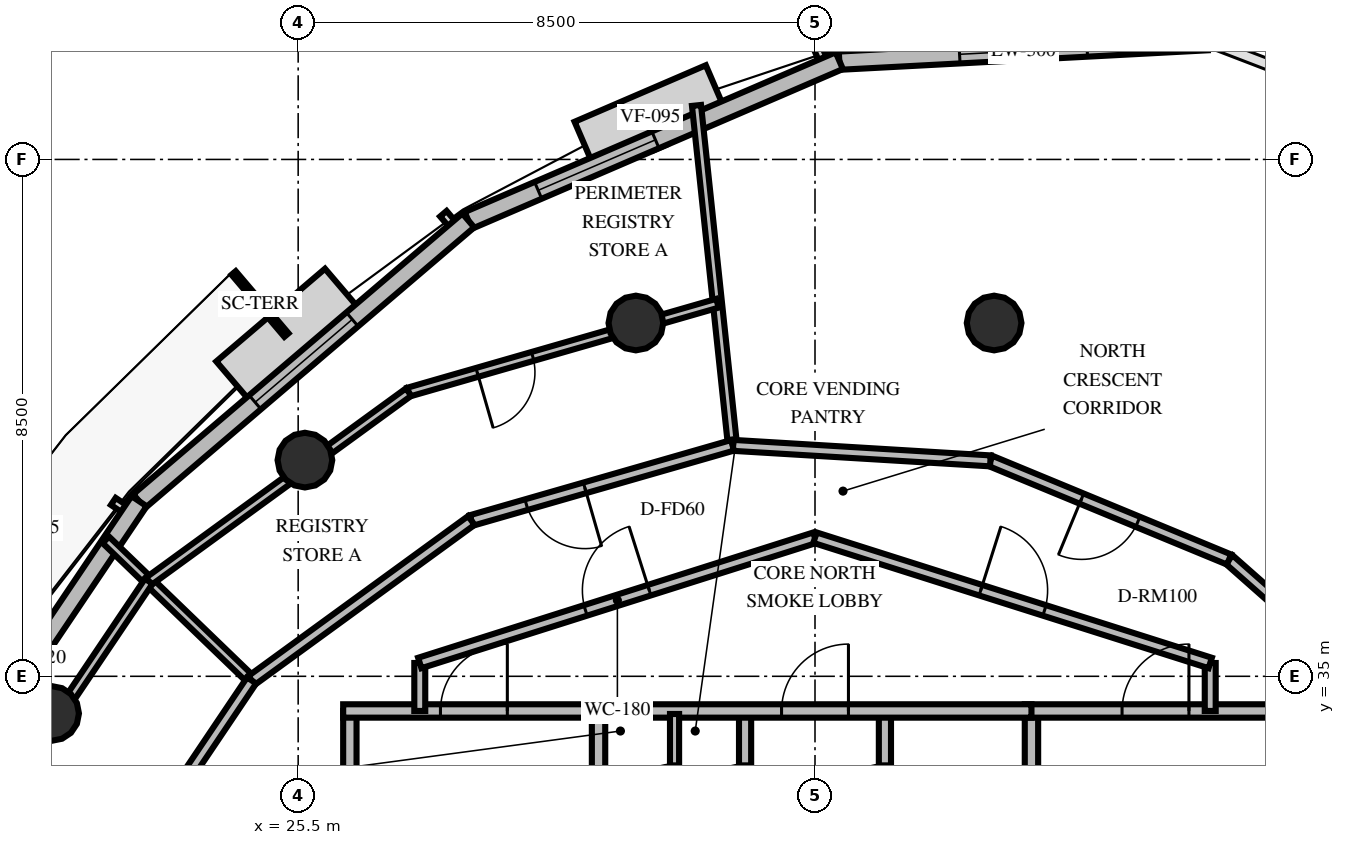
"""IFC4 building model, lengths in metres.
Left out: names, types, materials, properties, quantities, classifications, styles, units other than length and angle.
Written with IfcOpenShell. Run it as: python <this file> out.ifc"""

import sys

from ifc_helpers import new_model, si_unit, direction, frame, frame_2d, origin, origin_2d, place, context, subcontext, project, spatial, rectangle, circle, extrude, element, fill, save


model = new_model("IFC4")
c1 = context("Model", 3, precision=1e-05, world=origin(), true_north=direction((0.0, 1.0)))
c2 = subcontext(c1, "Body", "Model", "MODEL_VIEW")
j1 = project(units=[si_unit("LENGTHUNIT", "METRE"), si_unit("PLANEANGLEUNIT", "RADIAN")], contexts=[c1])
p1 = place(None, origin())
s1 = spatial("IfcSite", under=j1, at=p1, CompositionType="ELEMENT")
p2 = place(p1, origin())
s2 = spatial("IfcBuilding", under=s1, at=p2, CompositionType="ELEMENT")
p3 = place(p2, frame((0.0, 0.0, 262.8)))
s3 = spatial("IfcBuildingStorey", under=s2, at=p3, CompositionType="ELEMENT", Elevation=262.8)
for number, where, z_axis, x_axis in (
    (1, (36.946, 40.81, 0.0), (0.0, 0.0, 1.0), (1.0, 0.0, 0.0)),
    (2, (31.054, 40.81, 0.0), (0.0, 0.0, 1.0), (1.0, 0.0, 0.0)),
    (3, (25.611, 38.555, 0.0), (0.0, 0.0, 1.0), (1.0, 0.0, 0.0)),
    (4, (21.445, 34.389, 0.0), (0.0, 0.0, 1.0), (1.0, 0.0, 0.0)),
):
    element("IfcColumn", number, at=place(p3, frame(where, z_axis=z_axis, x_axis=x_axis)), inside=s3, PredefinedType="COLUMN", context=c2, shape_type="SweptSolid", body=[
        extrude(circle(Radius=0.45, at=origin_2d()), origin(), (0.0, 0.0, 1.0), 3.6),
    ])
p4 = place(p3, frame((40.453, 45.445, 0.0), z_axis=(0.0, 0.0, 1.0), x_axis=(-0.998600866894, -0.052880134633, 0.0)))
e5 = element("IfcWall", 5, at=p4, inside=s3, PredefinedType="SOLIDWALL", context=c2, shape_type="SweptSolid", body=[
    extrude(rectangle(XDim=6.062, YDim=0.3, at=frame_2d((3.031, 0.0))), origin(), (0.0, 0.0, 1.0), 2.76),
])
p5 = place(p4, frame((1.981, 0.0, 0.8)))
e6 = element("IfcOpeningElement", 6, at=p5, cuts=e5, PredefinedType="OPENING", context=c2, shape_type="SweptSolid", body=[
    extrude(rectangle(XDim=2.1, YDim=1.85, at=frame_2d((1.05, 0.925))), frame((0.0, 0.16, 0.0), z_axis=(0.0, -1.0, 0.0), x_axis=(1.0, 0.0, 0.0)), (0.0, 0.0, 1.0), 0.32),
])
p6 = place(p3, frame((34.399, 45.124, 0.0), z_axis=(0.0, 0.0, 1.0), x_axis=(-0.918476494061, -0.395475574287, 0.0)))
e7 = element("IfcWall", 7, at=p6, inside=s3, PredefinedType="SOLIDWALL", context=c2, shape_type="SweptSolid", body=[
    extrude(rectangle(XDim=6.643, YDim=0.3, at=frame_2d((3.322, 0.0))), origin(), (0.0, 0.0, 1.0), 2.76),
])
p7 = place(p6, frame((3.292, 0.0, 0.8)))
e8 = element("IfcOpeningElement", 8, at=p7, cuts=e7, PredefinedType="OPENING", context=c2, shape_type="SweptSolid", body=[
    extrude(rectangle(XDim=2.1, YDim=1.85, at=frame_2d((1.05, 0.925))), frame((0.0, 0.16, 0.0), z_axis=(0.0, -1.0, 0.0), x_axis=(1.0, 0.0, 0.0)), (0.0, 0.0, 1.0), 0.32),
])
p8 = place(p3, frame((28.298, 42.497, 0.0), z_axis=(0.0, 0.0, 1.0), x_axis=(-0.760867335081, -0.648907465211, 0.0)))
e9 = element("IfcWall", 9, at=p8, inside=s3, PredefinedType="SOLIDWALL", context=c2, shape_type="SweptSolid", body=[
    extrude(rectangle(XDim=7.115, YDim=0.3, at=frame_2d((3.558, 0.0))), origin(), (0.0, 0.0, 1.0), 2.76),
])
p9 = place(p8, frame((2.508, 0.0, 0.8)))
e10 = element("IfcOpeningElement", 10, at=p9, cuts=e9, PredefinedType="OPENING", context=c2, shape_type="SweptSolid", body=[
    extrude(rectangle(XDim=2.1, YDim=1.85, at=frame_2d((1.05, 0.925))), frame((0.0, 0.16, 0.0), z_axis=(0.0, -1.0, 0.0), x_axis=(1.0, 0.0, 0.0)), (0.0, 0.0, 1.0), 0.32),
])
p10 = place(p3, frame((22.884, 37.88, 0.0), z_axis=(0.0, 0.0, 1.0), x_axis=(-0.558472062766, -0.829523330057, 0.0)))
e11 = element("IfcWall", 11, at=p10, inside=s3, PredefinedType="SOLIDWALL", context=c2, shape_type="SweptSolid", body=[
    extrude(rectangle(XDim=7.293, YDim=0.3, at=frame_2d((3.646, 0.0))), origin(), (0.0, 0.0, 1.0), 2.76),
])
p11 = place(p10, frame((5.87, 0.0, 0.0)))
e12 = element("IfcOpeningElement", 12, at=p11, cuts=e11, PredefinedType="OPENING", context=c2, shape_type="SweptSolid", body=[
    extrude(rectangle(XDim=1.05, YDim=2.15, at=frame_2d((0.525, 1.075))), frame((0.0, 0.16, 0.0), z_axis=(0.0, -1.0, 0.0), x_axis=(1.0, 0.0, 0.0)), (0.0, 0.0, 1.0), 0.32),
])
p12 = place(p3, frame((26.35, 30.05, 0.0), z_axis=(0.0, 0.0, 1.0), x_axis=(0.0, 1.0, 0.0)))
e13 = element("IfcWall", 13, at=p12, inside=s3, PredefinedType="SOLIDWALL", context=c2, shape_type="SweptSolid", body=[
    extrude(rectangle(XDim=4.38, YDim=0.22, at=frame_2d((2.19, 0.0))), origin(), (0.0, 0.0, 1.0), 2.46),
])
p13 = place(p3, frame((30.44, 30.05, 0.0), z_axis=(0.0, 0.0, 1.0), x_axis=(0.0, 1.0, 0.0)))
e14 = element("IfcWall", 14, at=p13, inside=s3, PredefinedType="SOLIDWALL", context=c2, shape_type="SweptSolid", body=[
    extrude(rectangle(XDim=4.38, YDim=0.22, at=frame_2d((2.19, 0.0))), origin(), (0.0, 0.0, 1.0), 2.46),
])
p14 = place(p13, frame((0.8, 0.0, 0.0)))
e15 = element("IfcOpeningElement", 15, at=p14, cuts=e14, PredefinedType="OPENING", context=c2, shape_type="SweptSolid", body=[
    extrude(rectangle(XDim=1.05, YDim=2.1, at=frame_2d((0.525, 1.05))), frame((0.0, 0.12, 0.0), z_axis=(0.0, -1.0, 0.0), x_axis=(1.0, 0.0, 0.0)), (0.0, 0.0, 1.0), 0.24),
])
p15 = place(p3, frame((26.24, 34.43, 0.0), z_axis=(0.0, 0.0, 1.0), x_axis=(1.0, 0.0, 0.0)))
e16 = element("IfcWall", 16, at=p15, inside=s3, PredefinedType="SOLIDWALL", context=c2, shape_type="SweptSolid", body=[
    extrude(rectangle(XDim=4.31, YDim=0.22, at=frame_2d((2.155, 0.0))), origin(), (0.0, 0.0, 1.0), 2.46),
])
p16 = place(p15, frame((1.6, 0.0, 0.0)))
e17 = element("IfcOpeningElement", 17, at=p16, cuts=e16, PredefinedType="OPENING", context=c2, shape_type="SweptSolid", body=[
    extrude(rectangle(XDim=1.1, YDim=2.15, at=frame_2d((0.55, 1.075))), frame((0.0, 0.12, 0.0), z_axis=(0.0, -1.0, 0.0), x_axis=(1.0, 0.0, 0.0)), (0.0, 0.0, 1.0), 0.24),
])
p17 = place(p3, frame((32.85, 30.05, 0.0), z_axis=(0.0, 0.0, 1.0), x_axis=(0.0, 1.0, 0.0)))
e18 = element("IfcWall", 18, at=p17, inside=s3, PredefinedType="SOLIDWALL", context=c2, shape_type="SweptSolid", body=[
    extrude(rectangle(XDim=4.38, YDim=0.2, at=frame_2d((2.19, 0.0))), origin(), (0.0, 0.0, 1.0), 2.46),
])
p18 = place(p17, frame((2.65, 0.0, 0.0)))
e19 = element("IfcOpeningElement", 19, at=p18, cuts=e18, PredefinedType="OPENING", context=c2, shape_type="SweptSolid", body=[
    extrude(rectangle(XDim=0.86, YDim=2.05, at=frame_2d((0.43, 1.025))), frame((0.0, 0.11, 0.0), z_axis=(0.0, -1.0, 0.0), x_axis=(1.0, 0.0, 0.0)), (0.0, 0.0, 1.0), 0.22),
])
p19 = place(p3, frame((37.56, 30.05, 0.0), z_axis=(0.0, 0.0, 1.0), x_axis=(0.0, 1.0, 0.0)))
e20 = element("IfcWall", 20, at=p19, inside=s3, PredefinedType="SOLIDWALL", context=c2, shape_type="SweptSolid", body=[
    extrude(rectangle(XDim=4.38, YDim=0.22, at=frame_2d((2.19, 0.0))), origin(), (0.0, 0.0, 1.0), 2.46),
])
p20 = place(p19, frame((0.8, 0.0, 0.0)))
e21 = element("IfcOpeningElement", 21, at=p20, cuts=e20, PredefinedType="OPENING", context=c2, shape_type="SweptSolid", body=[
    extrude(rectangle(XDim=1.05, YDim=2.1, at=frame_2d((0.525, 1.05))), frame((0.0, 0.12, 0.0), z_axis=(0.0, -1.0, 0.0), x_axis=(1.0, 0.0, 0.0)), (0.0, 0.0, 1.0), 0.24),
])
p21 = place(p3, frame((37.45, 34.43, 0.0), z_axis=(0.0, 0.0, 1.0), x_axis=(1.0, 0.0, 0.0)))
e22 = element("IfcWall", 22, at=p21, inside=s3, PredefinedType="SOLIDWALL", context=c2, shape_type="SweptSolid", body=[
    extrude(rectangle(XDim=4.31, YDim=0.22, at=frame_2d((2.155, 0.0))), origin(), (0.0, 0.0, 1.0), 2.46),
])
p22 = place(p21, frame((1.6, 0.0, 0.0)))
e23 = element("IfcOpeningElement", 23, at=p22, cuts=e22, PredefinedType="OPENING", context=c2, shape_type="SweptSolid", body=[
    extrude(rectangle(XDim=1.1, YDim=2.15, at=frame_2d((0.55, 1.075))), frame((0.0, 0.12, 0.0), z_axis=(0.0, -1.0, 0.0), x_axis=(1.0, 0.0, 0.0)), (0.0, 0.0, 1.0), 0.24),
])
p23 = place(p3, frame((35.15, 30.05, 0.0), z_axis=(0.0, 0.0, 1.0), x_axis=(0.0, 1.0, 0.0)))
e24 = element("IfcWall", 24, at=p23, inside=s3, PredefinedType="SOLIDWALL", context=c2, shape_type="SweptSolid", body=[
    extrude(rectangle(XDim=4.38, YDim=0.2, at=frame_2d((2.19, 0.0))), origin(), (0.0, 0.0, 1.0), 2.46),
])
p24 = place(p23, frame((2.65, 0.0, 0.0)))
e25 = element("IfcOpeningElement", 25, at=p24, cuts=e24, PredefinedType="OPENING", context=c2, shape_type="SweptSolid", body=[
    extrude(rectangle(XDim=0.86, YDim=2.05, at=frame_2d((0.43, 1.025))), frame((0.0, 0.11, 0.0), z_axis=(0.0, -1.0, 0.0), x_axis=(1.0, 0.0, 0.0)), (0.0, 0.0, 1.0), 0.22),
])
p25 = place(p3, frame((30.44, 34.43, 0.0), z_axis=(0.0, 0.0, 1.0), x_axis=(1.0, 0.0, 0.0)))
e26 = element("IfcWall", 26, at=p25, inside=s3, PredefinedType="SOLIDWALL", context=c2, shape_type="SweptSolid", body=[
    extrude(rectangle(XDim=7.12, YDim=0.22, at=frame_2d((3.56, 0.0))), origin(), (0.0, 0.0, 1.0), 2.46),
])
p26 = place(p25, frame((3.01, 0.0, 0.0)))
e27 = element("IfcOpeningElement", 27, at=p26, cuts=e26, PredefinedType="OPENING", context=c2, shape_type="SweptSolid", body=[
    extrude(rectangle(XDim=1.1, YDim=2.15, at=frame_2d((0.55, 1.075))), frame((0.0, 0.12, 0.0), z_axis=(0.0, -1.0, 0.0), x_axis=(1.0, 0.0, 0.0)), (0.0, 0.0, 1.0), 0.24),
])
p27 = place(p3, frame((31.69, 32.05, 0.0), z_axis=(0.0, 0.0, 1.0), x_axis=(0.0, 1.0, 0.0)))
e28 = element("IfcWall", 28, at=p27, inside=s3, PredefinedType="PARTITIONING", context=c2, shape_type="SweptSolid", body=[
    extrude(rectangle(XDim=2.33, YDim=0.15, at=frame_2d((1.165, 0.0))), origin(), (0.0, 0.0, 1.0), 2.46),
])
p28 = place(p27, frame((0.65, 0.0, 0.0)))
e29 = element("IfcOpeningElement", 29, at=p28, cuts=e28, PredefinedType="OPENING", context=c2, shape_type="SweptSolid", body=[
    extrude(rectangle(XDim=0.86, YDim=2.05, at=frame_2d((0.43, 1.025))), frame((0.0, 0.085, 0.0), z_axis=(0.0, -1.0, 0.0), x_axis=(1.0, 0.0, 0.0)), (0.0, 0.0, 1.0), 0.17),
])
for number, where, z_axis, x_axis in (
    (30, (27.5, 34.43, 0.0), (0.0, 0.0, 1.0), (0.0, 1.0, 0.0)),
    (31, (40.5, 35.219, 0.0), (0.0, 0.0, 1.0), (0.0, -1.0, 0.0)),
):
    element("IfcWall", number, at=place(p3, frame(where, z_axis=z_axis, x_axis=x_axis)), inside=s3, PredefinedType="PARTITIONING", context=c2, shape_type="SweptSolid", body=[
        extrude(rectangle(XDim=0.789, YDim=0.18, at=frame_2d((0.395, 0.0))), origin(), (0.0, 0.0, 1.0), 2.46),
    ])
p29 = place(p3, frame((27.5, 35.219, 0.0), z_axis=(0.0, 0.0, 1.0), x_axis=(0.953228121756, 0.302251795518, 0.0)))
e32 = element("IfcWall", 32, at=p29, inside=s3, PredefinedType="PARTITIONING", context=c2, shape_type="SweptSolid", body=[
    extrude(rectangle(XDim=6.819, YDim=0.18, at=frame_2d((3.409, 0.0))), origin(), (0.0, 0.0, 1.0), 2.46),
])
p30 = place(p29, frame((2.86, 0.0, 0.0)))
e33 = element("IfcOpeningElement", 33, at=p30, cuts=e32, PredefinedType="OPENING", context=c2, shape_type="SweptSolid", body=[
    extrude(rectangle(XDim=1.1, YDim=2.15, at=frame_2d((0.55, 1.075))), frame((0.0, 0.1, 0.0), z_axis=(0.0, -1.0, 0.0), x_axis=(1.0, 0.0, 0.0)), (0.0, 0.0, 1.0), 0.2),
])
p31 = place(p3, frame((34.0, 37.28, 0.0), z_axis=(0.0, 0.0, 1.0), x_axis=(0.953228121756, -0.302251795518, 0.0)))
e34 = element("IfcWall", 34, at=p31, inside=s3, PredefinedType="PARTITIONING", context=c2, shape_type="SweptSolid", body=[
    extrude(rectangle(XDim=6.819, YDim=0.18, at=frame_2d((3.409, 0.0))), origin(), (0.0, 0.0, 1.0), 2.46),
])
p32 = place(p31, frame((2.86, 0.0, 0.0)))
e35 = element("IfcOpeningElement", 35, at=p32, cuts=e34, PredefinedType="OPENING", context=c2, shape_type="SweptSolid", body=[
    extrude(rectangle(XDim=1.1, YDim=2.15, at=frame_2d((0.55, 1.075))), frame((0.0, 0.1, 0.0), z_axis=(0.0, -1.0, 0.0), x_axis=(1.0, 0.0, 0.0)), (0.0, 0.0, 1.0), 0.2),
])
p33 = place(p3, frame((32.644, 38.798, 0.0), z_axis=(0.0, 0.0, 1.0), x_axis=(-0.105410494611, 0.994428794648, 0.0)))
e36 = element("IfcWall", 36, at=p33, inside=s3, PredefinedType="PARTITIONING", context=c2, shape_type="SweptSolid", body=[
    extrude(rectangle(XDim=5.621, YDim=0.15, at=frame_2d((2.811, 0.0))), origin(), (0.0, 0.0, 1.0), 2.46),
])
p34 = place(p3, frame((43.995, 34.108, 0.0), z_axis=(0.0, 0.0, 1.0), x_axis=(-0.749539264815, 0.66195988587, 0.0)))
e37 = element("IfcWall", 37, at=p34, inside=s3, PredefinedType="PARTITIONING", context=c2, shape_type="SweptSolid", body=[
    extrude(rectangle(XDim=4.248, YDim=0.18, at=frame_2d((2.124, 0.0))), origin(), (0.0, 0.0, 1.0), 2.46),
])
p35 = place(p3, frame((40.811, 36.92, 0.0), z_axis=(0.0, 0.0, 1.0), x_axis=(-0.924212047163, 0.381879682465, 0.0)))
e38 = element("IfcWall", 38, at=p35, inside=s3, PredefinedType="PARTITIONING", context=c2, shape_type="SweptSolid", body=[
    extrude(rectangle(XDim=4.248, YDim=0.18, at=frame_2d((2.124, 0.0))), origin(), (0.0, 0.0, 1.0), 2.46),
])
p36 = place(p35, frame((1.624, 0.0, 0.0)))
e39 = element("IfcOpeningElement", 39, at=p36, cuts=e38, PredefinedType="OPENING", context=c2, shape_type="SweptSolid", body=[
    extrude(rectangle(XDim=1.0, YDim=2.15, at=frame_2d((0.5, 1.075))), frame((0.0, 0.1, 0.0), z_axis=(0.0, -1.0, 0.0), x_axis=(1.0, 0.0, 0.0)), (0.0, 0.0, 1.0), 0.2),
])
p37 = place(p3, frame((36.884, 38.543, 0.0), z_axis=(0.0, 0.0, 1.0), x_axis=(-0.998188316722, 0.06016713688, 0.0)))
e40 = element("IfcWall", 40, at=p37, inside=s3, PredefinedType="PARTITIONING", context=c2, shape_type="SweptSolid", body=[
    extrude(rectangle(XDim=4.249, YDim=0.18, at=frame_2d((2.124, 0.0))), origin(), (0.0, 0.0, 1.0), 2.46),
])
p38 = place(p3, frame((24.734, 34.932, 0.0), z_axis=(0.0, 0.0, 1.0), x_axis=(-0.719960692402, 0.694014842345, 0.0)))
e41 = element("IfcWall", 41, at=p38, inside=s3, PredefinedType="PARTITIONING", context=c2, shape_type="SweptSolid", body=[
    extrude(rectangle(XDim=3.331, YDim=0.15, at=frame_2d((1.666, 0.0))), origin(), (0.0, 0.0, 1.0), 2.46),
])
p39 = place(p3, frame((32.644, 38.798, 0.0), z_axis=(0.0, 0.0, 1.0), x_axis=(-0.961015255025, -0.276495351878, 0.0)))
e42 = element("IfcWall", 42, at=p39, inside=s3, PredefinedType="PARTITIONING", context=c2, shape_type="SweptSolid", body=[
    extrude(rectangle(XDim=4.47, YDim=0.18, at=frame_2d((2.235, 0.0))), origin(), (0.0, 0.0, 1.0), 2.46),
])
p40 = place(p39, frame((2.527, 0.0, 0.0)))
e43 = element("IfcOpeningElement", 43, at=p40, cuts=e42, PredefinedType="OPENING", context=c2, shape_type="SweptSolid", body=[
    extrude(rectangle(XDim=1.0, YDim=2.15, at=frame_2d((0.5, 1.075))), frame((0.0, 0.1, 0.0), z_axis=(0.0, -1.0, 0.0), x_axis=(1.0, 0.0, 0.0)), (0.0, 0.0, 1.0), 0.2),
])
p41 = place(p3, frame((28.348, 37.562, 0.0), z_axis=(0.0, 0.0, 1.0), x_axis=(-0.808504545443, -0.588489931942, 0.0)))
e44 = element("IfcWall", 44, at=p41, inside=s3, PredefinedType="PARTITIONING", context=c2, shape_type="SweptSolid", body=[
    extrude(rectangle(XDim=4.47, YDim=0.18, at=frame_2d((2.235, 0.0))), origin(), (0.0, 0.0, 1.0), 2.46),
])
p42 = place(p3, frame((32.396, 41.135, 0.0), z_axis=(0.0, 0.0, 1.0), x_axis=(-0.961020381867, -0.276477531882, 0.0)))
e45 = element("IfcWall", 45, at=p42, inside=s3, PredefinedType="PARTITIONING", context=c2, shape_type="SweptSolid", body=[
    extrude(rectangle(XDim=5.286, YDim=0.15, at=frame_2d((2.643, 0.0))), origin(), (0.0, 0.0, 1.0), 2.46),
])
p43 = place(p42, frame((3.162, 0.0, 0.0)))
e46 = element("IfcOpeningElement", 46, at=p43, cuts=e45, PredefinedType="OPENING", context=c2, shape_type="SweptSolid", body=[
    extrude(rectangle(XDim=0.95, YDim=2.15, at=frame_2d((0.475, 1.075))), frame((0.0, 0.085, 0.0), z_axis=(0.0, -1.0, 0.0), x_axis=(1.0, 0.0, 0.0)), (0.0, 0.0, 1.0), 0.17),
])
p44 = place(p3, frame((27.316, 39.674, 0.0), z_axis=(0.0, 0.0, 1.0), x_axis=(-0.808492350613, -0.588506685604, 0.0)))
e47 = element("IfcWall", 47, at=p44, inside=s3, PredefinedType="PARTITIONING", context=c2, shape_type="SweptSolid", body=[
    extrude(rectangle(XDim=5.286, YDim=0.15, at=frame_2d((2.643, 0.0))), origin(), (0.0, 0.0, 1.0), 2.46),
])
p45 = place(p3, frame((24.734, 34.932, 0.0), z_axis=(0.0, 0.0, 1.0), x_axis=(-0.558488411433, -0.829512323172, 0.0)))
e48 = element("IfcWall", 48, at=p45, inside=s3, PredefinedType="PARTITIONING", context=c2, shape_type="SweptSolid", body=[
    extrude(rectangle(XDim=4.47, YDim=0.18, at=frame_2d((2.235, 0.0))), origin(), (0.0, 0.0, 1.0), 2.46),
])
p46 = place(p3, frame((23.042, 36.563, 0.0), z_axis=(0.0, 0.0, 1.0), x_axis=(-0.558510235994, -0.829497628863, 0.0)))
e49 = element("IfcWall", 49, at=p46, inside=s3, PredefinedType="PARTITIONING", context=c2, shape_type="SweptSolid", body=[
    extrude(rectangle(XDim=5.286, YDim=0.15, at=frame_2d((2.643, 0.0))), origin(), (0.0, 0.0, 1.0), 2.46),
])
p47 = place(p5, origin())
e50 = element("IfcWindow", 50, at=p47, inside=s3, PartitioningType="SINGLE_PANEL", PredefinedType="WINDOW", context=c2, shape_type="SweptSolid", body=[
    extrude(rectangle(XDim=2.1, YDim=1.85, at=frame_2d((1.05, 0.925))), frame((0.0, 0.03, 0.0), z_axis=(0.0, -1.0, 0.0), x_axis=(1.0, 0.0, 0.0)), (0.0, 0.0, 1.0), 0.06),
])
fill(e6, e50)
p48 = place(p7, origin())
e51 = element("IfcWindow", 51, at=p48, inside=s3, PartitioningType="SINGLE_PANEL", PredefinedType="WINDOW", context=c2, shape_type="SweptSolid", body=[
    extrude(rectangle(XDim=2.1, YDim=1.85, at=frame_2d((1.05, 0.925))), frame((0.0, 0.03, 0.0), z_axis=(0.0, -1.0, 0.0), x_axis=(1.0, 0.0, 0.0)), (0.0, 0.0, 1.0), 0.06),
])
fill(e8, e51)
p49 = place(p9, origin())
e52 = element("IfcWindow", 52, at=p49, inside=s3, PartitioningType="SINGLE_PANEL", PredefinedType="WINDOW", context=c2, shape_type="SweptSolid", body=[
    extrude(rectangle(XDim=2.1, YDim=1.85, at=frame_2d((1.05, 0.925))), frame((0.0, 0.03, 0.0), z_axis=(0.0, -1.0, 0.0), x_axis=(1.0, 0.0, 0.0)), (0.0, 0.0, 1.0), 0.06),
])
fill(e10, e52)
p50 = place(p16, origin())
e53 = element("IfcDoor", 53, at=p50, inside=s3, OperationType="SINGLE_SWING_RIGHT", PredefinedType="DOOR", context=c2, shape_type="SweptSolid", body=[
    extrude(rectangle(XDim=1.1, YDim=2.15, at=frame_2d((0.55, 1.075))), frame((0.0, 0.025, 0.0), z_axis=(0.0, -1.0, 0.0), x_axis=(1.0, 0.0, 0.0)), (0.0, 0.0, 1.0), 0.05),
])
fill(e17, e53)
p51 = place(p18, origin())
e54 = element("IfcDoor", 54, at=p51, inside=s3, OperationType="SINGLE_SWING_LEFT", PredefinedType="TRAPDOOR", context=c2, shape_type="SweptSolid", body=[
    extrude(rectangle(XDim=0.86, YDim=2.05, at=frame_2d((0.43, 1.025))), frame((0.0, 0.025, 0.0), z_axis=(0.0, -1.0, 0.0), x_axis=(1.0, 0.0, 0.0)), (0.0, 0.0, 1.0), 0.05),
])
fill(e19, e54)
p52 = place(p22, origin())
e55 = element("IfcDoor", 55, at=p52, inside=s3, OperationType="SINGLE_SWING_RIGHT", PredefinedType="DOOR", context=c2, shape_type="SweptSolid", body=[
    extrude(rectangle(XDim=1.1, YDim=2.15, at=frame_2d((0.55, 1.075))), frame((0.0, 0.025, 0.0), z_axis=(0.0, -1.0, 0.0), x_axis=(1.0, 0.0, 0.0)), (0.0, 0.0, 1.0), 0.05),
])
fill(e23, e55)
p53 = place(p24, origin())
e56 = element("IfcDoor", 56, at=p53, inside=s3, OperationType="SINGLE_SWING_LEFT", PredefinedType="TRAPDOOR", context=c2, shape_type="SweptSolid", body=[
    extrude(rectangle(XDim=0.86, YDim=2.05, at=frame_2d((0.43, 1.025))), frame((0.0, 0.025, 0.0), z_axis=(0.0, -1.0, 0.0), x_axis=(1.0, 0.0, 0.0)), (0.0, 0.0, 1.0), 0.05),
])
fill(e25, e56)
p54 = place(p26, origin())
e57 = element("IfcDoor", 57, at=p54, inside=s3, OperationType="SINGLE_SWING_RIGHT", PredefinedType="DOOR", context=c2, shape_type="SweptSolid", body=[
    extrude(rectangle(XDim=1.1, YDim=2.15, at=frame_2d((0.55, 1.075))), frame((0.0, 0.025, 0.0), z_axis=(0.0, -1.0, 0.0), x_axis=(1.0, 0.0, 0.0)), (0.0, 0.0, 1.0), 0.05),
])
fill(e27, e57)
p55 = place(p28, origin())
e58 = element("IfcDoor", 58, at=p55, inside=s3, OperationType="SINGLE_SWING_LEFT", PredefinedType="TRAPDOOR", context=c2, shape_type="SweptSolid", body=[
    extrude(rectangle(XDim=0.86, YDim=2.05, at=frame_2d((0.43, 1.025))), frame((0.0, 0.025, 0.0), z_axis=(0.0, -1.0, 0.0), x_axis=(1.0, 0.0, 0.0)), (0.0, 0.0, 1.0), 0.05),
])
fill(e29, e58)
p56 = place(p30, origin())
e59 = element("IfcDoor", 59, at=p56, inside=s3, OperationType="SINGLE_SWING_RIGHT", PredefinedType="DOOR", context=c2, shape_type="SweptSolid", body=[
    extrude(rectangle(XDim=1.1, YDim=2.15, at=frame_2d((0.55, 1.075))), frame((0.0, 0.025, 0.0), z_axis=(0.0, -1.0, 0.0), x_axis=(1.0, 0.0, 0.0)), (0.0, 0.0, 1.0), 0.05),
])
fill(e33, e59)
p57 = place(p32, origin())
e60 = element("IfcDoor", 60, at=p57, inside=s3, OperationType="SINGLE_SWING_LEFT", PredefinedType="DOOR", context=c2, shape_type="SweptSolid", body=[
    extrude(rectangle(XDim=1.1, YDim=2.15, at=frame_2d((0.55, 1.075))), frame((0.0, 0.025, 0.0), z_axis=(0.0, -1.0, 0.0), x_axis=(1.0, 0.0, 0.0)), (0.0, 0.0, 1.0), 0.05),
])
fill(e35, e60)
p58 = place(p36, origin())
e61 = element("IfcDoor", 61, at=p58, inside=s3, OperationType="SINGLE_SWING_RIGHT", PredefinedType="DOOR", context=c2, shape_type="SweptSolid", body=[
    extrude(rectangle(XDim=1.0, YDim=2.15, at=frame_2d((0.5, 1.075))), frame((0.0, 0.025, 0.0), z_axis=(0.0, -1.0, 0.0), x_axis=(1.0, 0.0, 0.0)), (0.0, 0.0, 1.0), 0.05),
])
fill(e39, e61)
p59 = place(p40, origin())
e62 = element("IfcDoor", 62, at=p59, inside=s3, OperationType="SINGLE_SWING_LEFT", PredefinedType="DOOR", context=c2, shape_type="SweptSolid", body=[
    extrude(rectangle(XDim=1.0, YDim=2.15, at=frame_2d((0.5, 1.075))), frame((0.0, 0.025, 0.0), z_axis=(0.0, -1.0, 0.0), x_axis=(1.0, 0.0, 0.0)), (0.0, 0.0, 1.0), 0.05),
])
fill(e43, e62)
p60 = place(p43, origin())
e63 = element("IfcDoor", 63, at=p60, inside=s3, OperationType="SINGLE_SWING_RIGHT", PredefinedType="DOOR", context=c2, shape_type="SweptSolid", body=[
    extrude(rectangle(XDim=0.95, YDim=2.15, at=frame_2d((0.475, 1.075))), frame((0.0, 0.025, 0.0), z_axis=(0.0, -1.0, 0.0), x_axis=(1.0, 0.0, 0.0)), (0.0, 0.0, 1.0), 0.05),
])
fill(e46, e63)
save(model, sys.argv[1])
